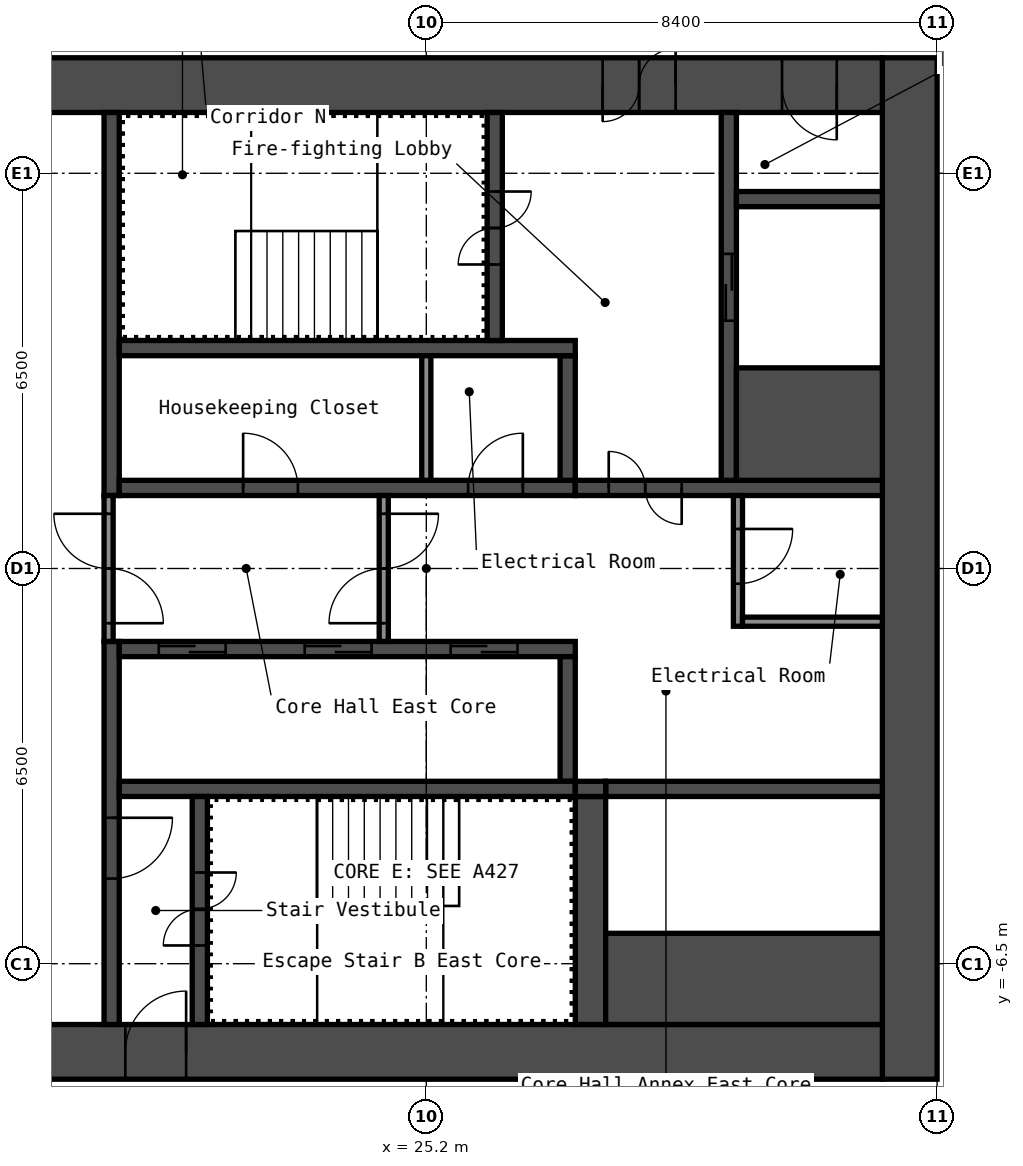
"""IFC4 building model, lengths in metres.
Left out: names, types, materials, properties, quantities, classifications, styles, units other than length and angle.
Written with IfcOpenShell. Run it as: python <this file> out.ifc"""

import sys

from ifc_helpers import new_model, si_unit, direction, frame, frame_2d, origin, place, context, subcontext, project, spatial, rectangle, extrude, element, fill, save


model = new_model("IFC4")
c1 = context("Model", 3, precision=1e-05, world=origin(), true_north=direction((0.0, 1.0)))
c2 = subcontext(c1, "Body", "Model", "MODEL_VIEW")
j1 = project(units=[si_unit("LENGTHUNIT", "METRE"), si_unit("PLANEANGLEUNIT", "RADIAN")], contexts=[c1])
p1 = place(None, origin())
s1 = spatial("IfcSite", under=j1, at=p1, CompositionType="ELEMENT")
p2 = place(p1, origin())
s2 = spatial("IfcBuilding", under=s1, at=p2, CompositionType="ELEMENT")
p3 = place(p2, frame((0.0, 0.0, 180.2)))
s3 = spatial("IfcBuildingStorey", under=s2, at=p3, CompositionType="ELEMENT", Elevation=180.2)
p4 = place(p3, frame((33.15, -8.4, 0.0), z_axis=(0.0, 0.0, 1.0), x_axis=(0.0, 1.0, 0.0)))
e1 = element("IfcWall", 1, at=p4, inside=s3, PredefinedType="SHEAR", context=c2, shape_type="SweptSolid", body=[
    extrude(rectangle(XDim=16.8, YDim=0.9, at=frame_2d((8.4, 0.0))), origin(), (0.0, 0.0, 1.0), 5.95),
])
p5 = place(p3, frame((17.7, 7.95, 0.0), z_axis=(0.0, 0.0, 1.0), x_axis=(1.0, 0.0, 0.0)))
e2 = element("IfcWall", 2, at=p5, inside=s3, PredefinedType="SHEAR", context=c2, shape_type="SweptSolid", body=[
    extrude(rectangle(XDim=15.0, YDim=0.9, at=frame_2d((7.5, 0.0))), origin(), (0.0, 0.0, 1.0), 5.95),
])
p6 = place(p5, frame((10.4, 0.0, 0.0)))
e3 = element("IfcOpeningElement", 3, at=p6, cuts=e2, PredefinedType="OPENING", context=c2, shape_type="SweptSolid", body=[
    extrude(rectangle(XDim=1.2, YDim=2.1, at=frame_2d((0.6, 1.05))), frame((0.0, 0.46, 0.0), z_axis=(0.0, -1.0, 0.0), x_axis=(1.0, 0.0, 0.0)), (0.0, 0.0, 1.0), 0.92),
])
p7 = place(p5, frame((13.35, 0.0, 0.0)))
e4 = element("IfcOpeningElement", 4, at=p7, cuts=e2, PredefinedType="OPENING", context=c2, shape_type="SweptSolid", body=[
    extrude(rectangle(XDim=0.9, YDim=2.1, at=frame_2d((0.45, 1.05))), frame((0.0, 0.46, 0.0), z_axis=(0.0, -1.0, 0.0), x_axis=(1.0, 0.0, 0.0)), (0.0, 0.0, 1.0), 0.92),
])
p8 = place(p3, frame((17.7, -7.95, 0.0), z_axis=(0.0, 0.0, 1.0), x_axis=(1.0, 0.0, 0.0)))
e5 = element("IfcWall", 5, at=p8, inside=s3, PredefinedType="SHEAR", context=c2, shape_type="SweptSolid", body=[
    extrude(rectangle(XDim=15.0, YDim=0.9, at=frame_2d((7.5, 0.0))), origin(), (0.0, 0.0, 1.0), 5.95),
])
p9 = place(p8, frame((2.55, 0.0, 0.0)))
e6 = element("IfcOpeningElement", 6, at=p9, cuts=e5, PredefinedType="OPENING", context=c2, shape_type="SweptSolid", body=[
    extrude(rectangle(XDim=1.0, YDim=2.1, at=frame_2d((0.5, 1.05))), frame((0.0, 0.46, 0.0), z_axis=(0.0, -1.0, 0.0), x_axis=(1.0, 0.0, 0.0)), (0.0, 0.0, 1.0), 0.92),
])
p10 = place(p3, frame((20.025, 1.2, 0.0), z_axis=(0.0, 0.0, 1.0), x_axis=(0.0, 1.0, 0.0)))
e7 = element("IfcWall", 7, at=p10, inside=s3, PredefinedType="SHEAR", context=c2, shape_type="SweptSolid", body=[
    extrude(rectangle(XDim=6.3, YDim=0.25, at=frame_2d((3.15, 0.0))), origin(), (0.0, 0.0, 1.0), 5.95),
])
p11 = place(p3, frame((20.025, -7.5, 0.0), z_axis=(0.0, 0.0, 1.0), x_axis=(0.0, 1.0, 0.0)))
e8 = element("IfcWall", 8, at=p11, inside=s3, PredefinedType="SHEAR", context=c2, shape_type="SweptSolid", body=[
    extrude(rectangle(XDim=6.3, YDim=0.25, at=frame_2d((3.15, 0.0))), origin(), (0.0, 0.0, 1.0), 5.95),
])
p12 = place(p11, frame((2.4, 0.0, 0.0)))
e9 = element("IfcOpeningElement", 9, at=p12, cuts=e8, PredefinedType="OPENING", context=c2, shape_type="SweptSolid", body=[
    extrude(rectangle(XDim=1.0, YDim=2.1, at=frame_2d((0.5, 1.05))), frame((0.0, 0.135, 0.0), z_axis=(0.0, -1.0, 0.0), x_axis=(1.0, 0.0, 0.0)), (0.0, 0.0, 1.0), 0.27),
])
p13 = place(p3, frame((20.15, 1.325, 0.0), z_axis=(0.0, 0.0, 1.0), x_axis=(1.0, 0.0, 0.0)))
e10 = element("IfcWall", 10, at=p13, inside=s3, PredefinedType="SHEAR", context=c2, shape_type="SweptSolid", body=[
    extrude(rectangle(XDim=7.5, YDim=0.25, at=frame_2d((3.75, 0.0))), origin(), (0.0, 0.0, 1.0), 5.95),
])
p14 = place(p13, frame((2.038, 0.0, 0.0)))
e11 = element("IfcOpeningElement", 11, at=p14, cuts=e10, PredefinedType="OPENING", context=c2, shape_type="SweptSolid", body=[
    extrude(rectangle(XDim=0.9, YDim=2.1, at=frame_2d((0.45, 1.05))), frame((0.0, 0.135, 0.0), z_axis=(0.0, -1.0, 0.0), x_axis=(1.0, 0.0, 0.0)), (0.0, 0.0, 1.0), 0.27),
])
p15 = place(p13, frame((5.738, 0.0, 0.0)))
e12 = element("IfcOpeningElement", 12, at=p15, cuts=e10, PredefinedType="OPENING", context=c2, shape_type="SweptSolid", body=[
    extrude(rectangle(XDim=0.9, YDim=2.1, at=frame_2d((0.45, 1.05))), frame((0.0, 0.135, 0.0), z_axis=(0.0, -1.0, 0.0), x_axis=(1.0, 0.0, 0.0)), (0.0, 0.0, 1.0), 0.27),
])
p16 = place(p3, frame((27.525, 1.45, 0.0), z_axis=(0.0, 0.0, 1.0), x_axis=(0.0, 1.0, 0.0)))
e13 = element("IfcWall", 13, at=p16, inside=s3, PredefinedType="SHEAR", context=c2, shape_type="SweptSolid", body=[
    extrude(rectangle(XDim=2.05, YDim=0.25, at=frame_2d((1.025, 0.0))), origin(), (0.0, 0.0, 1.0), 5.95),
])
p17 = place(p3, frame((20.15, 3.625, 0.0), z_axis=(0.0, 0.0, 1.0), x_axis=(1.0, 0.0, 0.0)))
e14 = element("IfcWall", 14, at=p17, inside=s3, PredefinedType="SHEAR", context=c2, shape_type="SweptSolid", body=[
    extrude(rectangle(XDim=7.5, YDim=0.25, at=frame_2d((3.75, 0.0))), origin(), (0.0, 0.0, 1.0), 5.95),
])
p18 = place(p3, frame((26.325, 3.75, 0.0), z_axis=(0.0, 0.0, 1.0), x_axis=(0.0, 1.0, 0.0)))
e15 = element("IfcWall", 15, at=p18, inside=s3, PredefinedType="SHEAR", context=c2, shape_type="SweptSolid", body=[
    extrude(rectangle(XDim=3.75, YDim=0.25, at=frame_2d((1.875, 0.0))), origin(), (0.0, 0.0, 1.0), 5.95),
])
p19 = place(p18, frame((1.25, 0.0, 0.0)))
e16 = element("IfcOpeningElement", 16, at=p19, cuts=e15, PredefinedType="OPENING", context=c2, shape_type="SweptSolid", body=[
    extrude(rectangle(XDim=1.2, YDim=2.1, at=frame_2d((0.6, 1.05))), frame((0.0, 0.135, 0.0), z_axis=(0.0, -1.0, 0.0), x_axis=(1.0, 0.0, 0.0)), (0.0, 0.0, 1.0), 0.27),
])
p20 = place(p3, frame((27.65, 1.325, 0.0), z_axis=(0.0, 0.0, 1.0), x_axis=(1.0, 0.0, 0.0)))
e17 = element("IfcWall", 17, at=p20, inside=s3, PredefinedType="SHEAR", context=c2, shape_type="SweptSolid", body=[
    extrude(rectangle(XDim=5.05, YDim=0.25, at=frame_2d((2.525, 0.0))), origin(), (0.0, 0.0, 1.0), 5.95),
])
p21 = place(p20, frame((0.55, 0.0, 0.0)))
e18 = element("IfcOpeningElement", 18, at=p21, cuts=e17, PredefinedType="OPENING", context=c2, shape_type="SweptSolid", body=[
    extrude(rectangle(XDim=1.2, YDim=2.1, at=frame_2d((0.6, 1.05))), frame((0.0, 0.135, 0.0), z_axis=(0.0, -1.0, 0.0), x_axis=(1.0, 0.0, 0.0)), (0.0, 0.0, 1.0), 0.27),
])
p22 = place(p3, frame((30.175, 1.45, 0.0), z_axis=(0.0, 0.0, 1.0), x_axis=(0.0, 1.0, 0.0)))
e19 = element("IfcWall", 19, at=p22, inside=s3, PredefinedType="SHEAR", context=c2, shape_type="SweptSolid", body=[
    extrude(rectangle(XDim=6.05, YDim=0.25, at=frame_2d((3.025, 0.0))), origin(), (0.0, 0.0, 1.0), 5.95),
])
p23 = place(p22, frame((2.625, 0.0, 0.0)))
e20 = element("IfcOpeningElement", 20, at=p23, cuts=e19, PredefinedType="OPENING", context=c2, shape_type="SweptSolid", body=[
    extrude(rectangle(XDim=1.1, YDim=2.1, at=frame_2d((0.55, 1.05))), frame((0.0, 0.135, 0.0), z_axis=(0.0, -1.0, 0.0), x_axis=(1.0, 0.0, 0.0)), (0.0, 0.0, 1.0), 0.27),
])
p24 = place(p3, frame((30.3, 2.375, 0.0), z_axis=(0.0, 0.0, 1.0), x_axis=(1.0, 0.0, 0.0)))
e21 = element("IfcWall", 21, at=p24, inside=s3, PredefinedType="SHEAR", context=c2, shape_type="SweptSolid", body=[
    extrude(rectangle(XDim=2.4, YDim=1.85, at=frame_2d((1.2, 0.0))), origin(), (0.0, 0.0, 1.0), 5.95),
])
p25 = place(p3, frame((30.3, 6.075, 0.0), z_axis=(0.0, 0.0, 1.0), x_axis=(1.0, 0.0, 0.0)))
e22 = element("IfcWall", 22, at=p25, inside=s3, PredefinedType="SHEAR", context=c2, shape_type="SweptSolid", body=[
    extrude(rectangle(XDim=2.4, YDim=0.25, at=frame_2d((1.2, 0.0))), origin(), (0.0, 0.0, 1.0), 5.95),
])
p26 = place(p3, frame((20.15, -1.325, 0.0), z_axis=(0.0, 0.0, 1.0), x_axis=(1.0, 0.0, 0.0)))
e23 = element("IfcWall", 23, at=p26, inside=s3, PredefinedType="SHEAR", context=c2, shape_type="SweptSolid", body=[
    extrude(rectangle(XDim=7.5, YDim=0.25, at=frame_2d((3.75, 0.0))), origin(), (0.0, 0.0, 1.0), 5.95),
])
p27 = place(p26, frame((0.65, 0.0, 0.0)))
e24 = element("IfcOpeningElement", 24, at=p27, cuts=e23, PredefinedType="OPENING", context=c2, shape_type="SweptSolid", body=[
    extrude(rectangle(XDim=1.1, YDim=2.1, at=frame_2d((0.55, 1.05))), frame((0.0, 0.135, 0.0), z_axis=(0.0, -1.0, 0.0), x_axis=(1.0, 0.0, 0.0)), (0.0, 0.0, 1.0), 0.27),
])
p28 = place(p26, frame((3.05, 0.0, 0.0)))
e25 = element("IfcOpeningElement", 25, at=p28, cuts=e23, PredefinedType="OPENING", context=c2, shape_type="SweptSolid", body=[
    extrude(rectangle(XDim=1.1, YDim=2.1, at=frame_2d((0.55, 1.05))), frame((0.0, 0.135, 0.0), z_axis=(0.0, -1.0, 0.0), x_axis=(1.0, 0.0, 0.0)), (0.0, 0.0, 1.0), 0.27),
])
p29 = place(p26, frame((5.45, 0.0, 0.0)))
e26 = element("IfcOpeningElement", 26, at=p29, cuts=e23, PredefinedType="OPENING", context=c2, shape_type="SweptSolid", body=[
    extrude(rectangle(XDim=1.1, YDim=2.1, at=frame_2d((0.55, 1.05))), frame((0.0, 0.135, 0.0), z_axis=(0.0, -1.0, 0.0), x_axis=(1.0, 0.0, 0.0)), (0.0, 0.0, 1.0), 0.27),
])
p30 = place(p3, frame((27.525, -3.5, 0.0), z_axis=(0.0, 0.0, 1.0), x_axis=(0.0, 1.0, 0.0)))
e27 = element("IfcWall", 27, at=p30, inside=s3, PredefinedType="SHEAR", context=c2, shape_type="SweptSolid", body=[
    extrude(rectangle(XDim=2.05, YDim=0.25, at=frame_2d((1.025, 0.0))), origin(), (0.0, 0.0, 1.0), 5.95),
])
p31 = place(p3, frame((20.15, -3.625, 0.0), z_axis=(0.0, 0.0, 1.0), x_axis=(1.0, 0.0, 0.0)))
e28 = element("IfcWall", 28, at=p31, inside=s3, PredefinedType="SHEAR", context=c2, shape_type="SweptSolid", body=[
    extrude(rectangle(XDim=7.5, YDim=0.25, at=frame_2d((3.75, 0.0))), origin(), (0.0, 0.0, 1.0), 5.95),
])
p32 = place(p3, frame((21.475, -7.5, 0.0), z_axis=(0.0, 0.0, 1.0), x_axis=(0.0, 1.0, 0.0)))
e29 = element("IfcWall", 29, at=p32, inside=s3, PredefinedType="SHEAR", context=c2, shape_type="SweptSolid", body=[
    extrude(rectangle(XDim=3.75, YDim=0.25, at=frame_2d((1.875, 0.0))), origin(), (0.0, 0.0, 1.0), 5.95),
])
p33 = place(p32, frame((1.3, 0.0, 0.0)))
e30 = element("IfcOpeningElement", 30, at=p33, cuts=e29, PredefinedType="OPENING", context=c2, shape_type="SweptSolid", body=[
    extrude(rectangle(XDim=1.2, YDim=2.1, at=frame_2d((0.6, 1.05))), frame((0.0, 0.135, 0.0), z_axis=(0.0, -1.0, 0.0), x_axis=(1.0, 0.0, 0.0)), (0.0, 0.0, 1.0), 0.27),
])
p34 = place(p3, frame((27.9, -7.5, 0.0), z_axis=(0.0, 0.0, 1.0), x_axis=(0.0, 1.0, 0.0)))
e31 = element("IfcWall", 31, at=p34, inside=s3, PredefinedType="SHEAR", context=c2, shape_type="SweptSolid", body=[
    extrude(rectangle(XDim=3.75, YDim=0.5, at=frame_2d((1.875, 0.0))), origin(), (0.0, 0.0, 1.0), 5.95),
])
p35 = place(p3, frame((28.15, -3.625, 0.0), z_axis=(0.0, 0.0, 1.0), x_axis=(1.0, 0.0, 0.0)))
e32 = element("IfcWall", 32, at=p35, inside=s3, PredefinedType="SHEAR", context=c2, shape_type="SweptSolid", body=[
    extrude(rectangle(XDim=4.55, YDim=0.25, at=frame_2d((2.275, 0.0))), origin(), (0.0, 0.0, 1.0), 5.95),
])
p36 = place(p3, frame((28.15, -6.75, 0.0), z_axis=(0.0, 0.0, 1.0), x_axis=(1.0, 0.0, 0.0)))
e33 = element("IfcWall", 33, at=p36, inside=s3, PredefinedType="SHEAR", context=c2, shape_type="SweptSolid", body=[
    extrude(rectangle(XDim=4.55, YDim=1.5, at=frame_2d((2.275, 0.0))), origin(), (0.0, 0.0, 1.0), 5.95),
])
p37 = place(p3, frame((27.65, -3.625, 0.0), z_axis=(0.0, 0.0, 1.0), x_axis=(1.0, 0.0, 0.0)))
e34 = element("IfcWall", 34, at=p37, inside=s3, PredefinedType="SHEAR", context=c2, shape_type="SweptSolid", body=[
    extrude(rectangle(XDim=0.5, YDim=0.25, at=frame_2d((0.25, 0.0))), origin(), (0.0, 0.0, 1.0), 5.95),
])
p38 = place(p3, frame((19.975, -1.2, 0.0), z_axis=(0.0, 0.0, 1.0), x_axis=(0.0, 1.0, 0.0)))
e35 = element("IfcWall", 35, at=p38, inside=s3, PredefinedType="PARTITIONING", context=c2, shape_type="SweptSolid", body=[
    extrude(rectangle(XDim=2.4, YDim=0.15, at=frame_2d((1.2, 0.0))), origin(), (0.0, 0.0, 1.0), 5.95),
])
p39 = place(p38, frame((0.3, 0.0, 0.0)))
e36 = element("IfcOpeningElement", 36, at=p39, cuts=e35, PredefinedType="OPENING", context=c2, shape_type="SweptSolid", body=[
    extrude(rectangle(XDim=1.8, YDim=2.1, at=frame_2d((0.9, 1.05))), frame((0.0, 0.085, 0.0), z_axis=(0.0, -1.0, 0.0), x_axis=(1.0, 0.0, 0.0)), (0.0, 0.0, 1.0), 0.17),
])
p40 = place(p3, frame((24.5, -1.2, 0.0), z_axis=(0.0, 0.0, 1.0), x_axis=(0.0, 1.0, 0.0)))
e37 = element("IfcWall", 37, at=p40, inside=s3, PredefinedType="PARTITIONING", context=c2, shape_type="SweptSolid", body=[
    extrude(rectangle(XDim=2.4, YDim=0.15, at=frame_2d((1.2, 0.0))), origin(), (0.0, 0.0, 1.0), 5.95),
])
p41 = place(p40, frame((0.3, 0.0, 0.0)))
e38 = element("IfcOpeningElement", 38, at=p41, cuts=e37, PredefinedType="OPENING", context=c2, shape_type="SweptSolid", body=[
    extrude(rectangle(XDim=1.8, YDim=2.1, at=frame_2d((0.9, 1.05))), frame((0.0, 0.085, 0.0), z_axis=(0.0, -1.0, 0.0), x_axis=(1.0, 0.0, 0.0)), (0.0, 0.0, 1.0), 0.17),
])
p42 = place(p3, frame((30.325, -0.95, 0.0), z_axis=(0.0, 0.0, 1.0), x_axis=(0.0, 1.0, 0.0)))
e39 = element("IfcWall", 39, at=p42, inside=s3, PredefinedType="PARTITIONING", context=c2, shape_type="SweptSolid", body=[
    extrude(rectangle(XDim=2.15, YDim=0.15, at=frame_2d((1.075, 0.0))), origin(), (0.0, 0.0, 1.0), 5.95),
])
p43 = place(p42, frame((0.7, 0.0, 0.0)))
e40 = element("IfcOpeningElement", 40, at=p43, cuts=e39, PredefinedType="OPENING", context=c2, shape_type="SweptSolid", body=[
    extrude(rectangle(XDim=0.9, YDim=2.1, at=frame_2d((0.45, 1.05))), frame((0.0, 0.085, 0.0), z_axis=(0.0, -1.0, 0.0), x_axis=(1.0, 0.0, 0.0)), (0.0, 0.0, 1.0), 0.17),
])
p44 = place(p3, frame((30.4, -0.875, 0.0), z_axis=(0.0, 0.0, 1.0), x_axis=(1.0, 0.0, 0.0)))
e41 = element("IfcWall", 41, at=p44, inside=s3, PredefinedType="PARTITIONING", context=c2, shape_type="SweptSolid", body=[
    extrude(rectangle(XDim=2.3, YDim=0.15, at=frame_2d((1.15, 0.0))), origin(), (0.0, 0.0, 1.0), 5.95),
])
p45 = place(p3, frame((25.2, 1.45, 0.0), z_axis=(0.0, 0.0, 1.0), x_axis=(0.0, 1.0, 0.0)))
e42 = element("IfcWall", 42, at=p45, inside=s3, PredefinedType="PARTITIONING", context=c2, shape_type="SweptSolid", body=[
    extrude(rectangle(XDim=2.05, YDim=0.15, at=frame_2d((1.025, 0.0))), origin(), (0.0, 0.0, 1.0), 5.95),
])
p46 = place(p6, origin())
e43 = element("IfcDoor", 43, at=p46, inside=s3, OperationType="DOUBLE_DOOR_SINGLE_SWING", PredefinedType="DOOR", context=c2, shape_type="SweptSolid", body=[
    extrude(rectangle(XDim=1.2, YDim=2.1, at=frame_2d((0.6, 1.05))), frame((0.0, 0.025, 0.0), z_axis=(0.0, -1.0, 0.0), x_axis=(1.0, 0.0, 0.0)), (0.0, 0.0, 1.0), 0.05),
])
fill(e3, e43)
p47 = place(p7, origin())
e44 = element("IfcDoor", 44, at=p47, inside=s3, OperationType="SINGLE_SWING_RIGHT", PredefinedType="DOOR", context=c2, shape_type="SweptSolid", body=[
    extrude(rectangle(XDim=0.9, YDim=2.1, at=frame_2d((0.45, 1.05))), frame((0.0, 0.025, 0.0), z_axis=(0.0, -1.0, 0.0), x_axis=(1.0, 0.0, 0.0)), (0.0, 0.0, 1.0), 0.05),
])
fill(e4, e44)
p48 = place(p9, origin())
e45 = element("IfcDoor", 45, at=p48, inside=s3, OperationType="SINGLE_SWING_LEFT", PredefinedType="DOOR", context=c2, shape_type="SweptSolid", body=[
    extrude(rectangle(XDim=1.0, YDim=2.1, at=frame_2d((0.5, 1.05))), frame((0.0, 0.025, 0.0), z_axis=(0.0, -1.0, 0.0), x_axis=(1.0, 0.0, 0.0)), (0.0, 0.0, 1.0), 0.05),
])
fill(e6, e45)
p49 = place(p19, origin())
e46 = element("IfcDoor", 46, at=p49, inside=s3, OperationType="DOUBLE_DOOR_SINGLE_SWING", PredefinedType="DOOR", context=c2, shape_type="SweptSolid", body=[
    extrude(rectangle(XDim=1.2, YDim=2.1, at=frame_2d((0.6, 1.05))), frame((0.0, 0.025, 0.0), z_axis=(0.0, -1.0, 0.0), x_axis=(1.0, 0.0, 0.0)), (0.0, 0.0, 1.0), 0.05),
])
fill(e16, e46)
p50 = place(p33, origin())
e47 = element("IfcDoor", 47, at=p50, inside=s3, OperationType="DOUBLE_DOOR_SINGLE_SWING", PredefinedType="DOOR", context=c2, shape_type="SweptSolid", body=[
    extrude(rectangle(XDim=1.2, YDim=2.1, at=frame_2d((0.6, 1.05))), frame((0.0, 0.025, 0.0), z_axis=(0.0, -1.0, 0.0), x_axis=(1.0, 0.0, 0.0)), (0.0, 0.0, 1.0), 0.05),
])
fill(e30, e47)
p51 = place(p12, origin())
e48 = element("IfcDoor", 48, at=p51, inside=s3, OperationType="SINGLE_SWING_RIGHT", PredefinedType="DOOR", context=c2, shape_type="SweptSolid", body=[
    extrude(rectangle(XDim=1.0, YDim=2.1, at=frame_2d((0.5, 1.05))), frame((0.0, 0.025, 0.0), z_axis=(0.0, -1.0, 0.0), x_axis=(1.0, 0.0, 0.0)), (0.0, 0.0, 1.0), 0.05),
])
fill(e9, e48)
p52 = place(p21, origin())
e49 = element("IfcDoor", 49, at=p52, inside=s3, OperationType="DOUBLE_DOOR_SINGLE_SWING", PredefinedType="DOOR", context=c2, shape_type="SweptSolid", body=[
    extrude(rectangle(XDim=1.2, YDim=2.1, at=frame_2d((0.6, 1.05))), frame((0.0, 0.025, 0.0), z_axis=(0.0, -1.0, 0.0), x_axis=(1.0, 0.0, 0.0)), (0.0, 0.0, 1.0), 0.05),
])
fill(e18, e49)
p53 = place(p39, origin())
e50 = element("IfcDoor", 50, at=p53, inside=s3, OperationType="DOUBLE_DOOR_SINGLE_SWING", PredefinedType="DOOR", context=c2, shape_type="SweptSolid", body=[
    extrude(rectangle(XDim=1.8, YDim=2.1, at=frame_2d((0.9, 1.05))), frame((0.0, 0.025, 0.0), z_axis=(0.0, -1.0, 0.0), x_axis=(1.0, 0.0, 0.0)), (0.0, 0.0, 1.0), 0.05),
])
fill(e36, e50)
p54 = place(p41, origin())
e51 = element("IfcDoor", 51, at=p54, inside=s3, OperationType="DOUBLE_DOOR_SINGLE_SWING", PredefinedType="DOOR", context=c2, shape_type="SweptSolid", body=[
    extrude(rectangle(XDim=1.8, YDim=2.1, at=frame_2d((0.9, 1.05))), frame((0.0, 0.025, 0.0), z_axis=(0.0, -1.0, 0.0), x_axis=(1.0, 0.0, 0.0)), (0.0, 0.0, 1.0), 0.05),
])
fill(e38, e51)
p55 = place(p43, origin())
e52 = element("IfcDoor", 52, at=p55, inside=s3, OperationType="SINGLE_SWING_RIGHT", PredefinedType="DOOR", context=c2, shape_type="SweptSolid", body=[
    extrude(rectangle(XDim=0.9, YDim=2.1, at=frame_2d((0.45, 1.05))), frame((0.0, 0.025, 0.0), z_axis=(0.0, -1.0, 0.0), x_axis=(1.0, 0.0, 0.0)), (0.0, 0.0, 1.0), 0.05),
])
fill(e40, e52)
p56 = place(p14, origin())
e53 = element("IfcDoor", 53, at=p56, inside=s3, OperationType="SINGLE_SWING_RIGHT", PredefinedType="DOOR", context=c2, shape_type="SweptSolid", body=[
    extrude(rectangle(XDim=0.9, YDim=2.1, at=frame_2d((0.45, 1.05))), frame((0.0, 0.025, 0.0), z_axis=(0.0, -1.0, 0.0), x_axis=(1.0, 0.0, 0.0)), (0.0, 0.0, 1.0), 0.05),
])
fill(e11, e53)
p57 = place(p15, origin())
e54 = element("IfcDoor", 54, at=p57, inside=s3, OperationType="SINGLE_SWING_LEFT", PredefinedType="DOOR", context=c2, shape_type="SweptSolid", body=[
    extrude(rectangle(XDim=0.9, YDim=2.1, at=frame_2d((0.45, 1.05))), frame((0.0, 0.025, 0.0), z_axis=(0.0, -1.0, 0.0), x_axis=(1.0, 0.0, 0.0)), (0.0, 0.0, 1.0), 0.05),
])
fill(e12, e54)
p58 = place(p27, origin())
e55 = element("IfcDoor", 55, at=p58, inside=s3, OperationType="DOUBLE_DOOR_SLIDING", PredefinedType="DOOR", context=c2, shape_type="SweptSolid", body=[
    extrude(rectangle(XDim=1.1, YDim=2.1, at=frame_2d((0.55, 1.05))), frame((0.0, 0.025, 0.0), z_axis=(0.0, -1.0, 0.0), x_axis=(1.0, 0.0, 0.0)), (0.0, 0.0, 1.0), 0.05),
])
fill(e24, e55)
p59 = place(p28, origin())
e56 = element("IfcDoor", 56, at=p59, inside=s3, OperationType="DOUBLE_DOOR_SLIDING", PredefinedType="DOOR", context=c2, shape_type="SweptSolid", body=[
    extrude(rectangle(XDim=1.1, YDim=2.1, at=frame_2d((0.55, 1.05))), frame((0.0, 0.025, 0.0), z_axis=(0.0, -1.0, 0.0), x_axis=(1.0, 0.0, 0.0)), (0.0, 0.0, 1.0), 0.05),
])
fill(e25, e56)
p60 = place(p29, origin())
e57 = element("IfcDoor", 57, at=p60, inside=s3, OperationType="DOUBLE_DOOR_SLIDING", PredefinedType="DOOR", context=c2, shape_type="SweptSolid", body=[
    extrude(rectangle(XDim=1.1, YDim=2.1, at=frame_2d((0.55, 1.05))), frame((0.0, 0.025, 0.0), z_axis=(0.0, -1.0, 0.0), x_axis=(1.0, 0.0, 0.0)), (0.0, 0.0, 1.0), 0.05),
])
fill(e26, e57)
p61 = place(p23, origin())
e58 = element("IfcDoor", 58, at=p61, inside=s3, OperationType="DOUBLE_DOOR_SLIDING", PredefinedType="DOOR", context=c2, shape_type="SweptSolid", body=[
    extrude(rectangle(XDim=1.1, YDim=2.1, at=frame_2d((0.55, 1.05))), frame((0.0, 0.025, 0.0), z_axis=(0.0, -1.0, 0.0), x_axis=(1.0, 0.0, 0.0)), (0.0, 0.0, 1.0), 0.05),
])
fill(e20, e58)
save(model, sys.argv[1])
